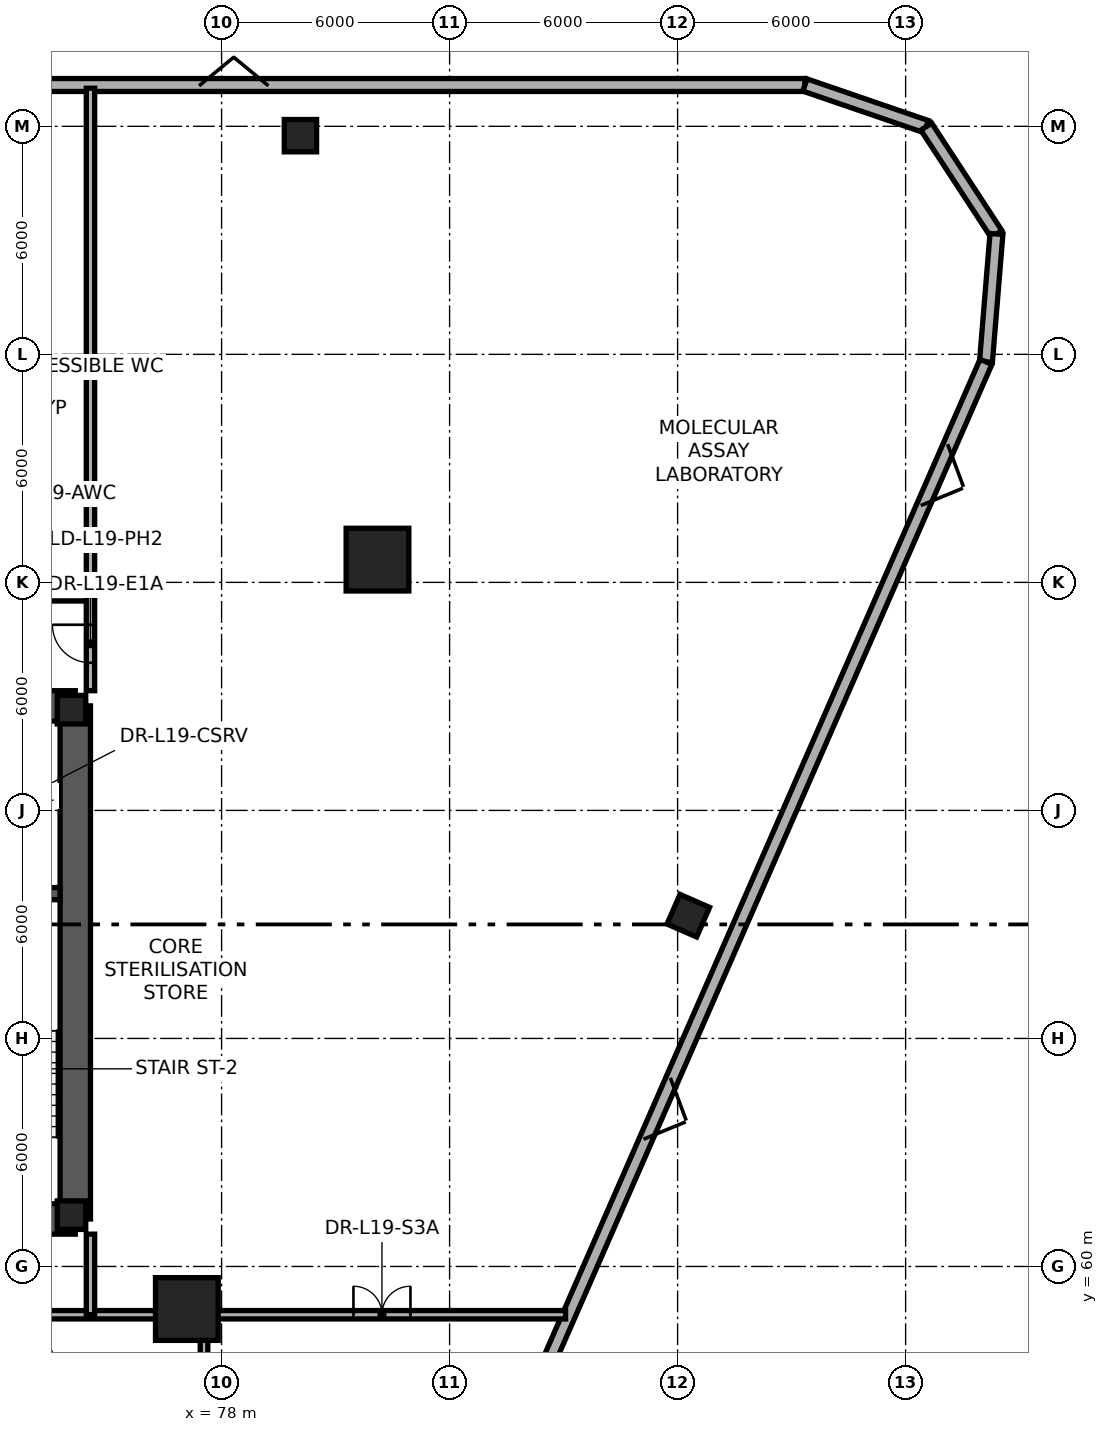
"""IFC4 building model, lengths in metres.
Left out: names, types, materials, properties, quantities, classifications, styles, units other than length and angle.
Written with IfcOpenShell. Run it as: python <this file> out.ifc"""

import sys

from ifc_helpers import new_model, si_unit, direction, frame, frame_2d, origin, origin_2d, place, context, subcontext, project, spatial, rectangle, extrude, element, fill, save


model = new_model("IFC4")
c1 = context("Model", 3, precision=1e-05, world=origin(), true_north=direction((0.0, 1.0)))
c2 = subcontext(c1, "Body", "Model", "MODEL_VIEW")
j1 = project(units=[si_unit("LENGTHUNIT", "METRE"), si_unit("PLANEANGLEUNIT", "RADIAN")], contexts=[c1])
p1 = place(None, origin())
s1 = spatial("IfcSite", under=j1, at=p1, CompositionType="ELEMENT")
p2 = place(p1, origin())
s2 = spatial("IfcBuilding", under=s1, at=p2, CompositionType="ELEMENT")
p3 = place(p2, frame((0.0, 0.0, 75.0)))
s3 = spatial("IfcBuildingStorey", under=s2, at=p3, CompositionType="ELEMENT", Elevation=75.0)
p4 = place(p3, frame((57.85, 61.25, 0.0), z_axis=(0.0, 0.0, 1.0), x_axis=(1.0, 0.0, 0.0)))
e1 = element("IfcWall", 1, at=p4, inside=s3, PredefinedType="SHEAR", context=c2, shape_type="SweptSolid", body=[
    extrude(rectangle(XDim=16.3, YDim=0.8, at=frame_2d((8.15, 0.0))), origin(), (0.0, 0.0, 1.0), 3.65),
])
p5 = place(p4, frame((1.35, 0.0, 0.0)))
e2 = element("IfcOpeningElement", 2, at=p5, cuts=e1, PredefinedType="OPENING", context=c2, shape_type="SweptSolid", body=[
    extrude(rectangle(XDim=1.15, YDim=2.15, at=frame_2d((0.575, 1.075))), frame((0.0, 0.41, 0.0), z_axis=(0.0, -1.0, 0.0), x_axis=(1.0, 0.0, 0.0)), (0.0, 0.0, 1.0), 0.82),
])
p6 = place(p4, frame((6.1, 0.0, 0.0)))
e3 = element("IfcOpeningElement", 3, at=p6, cuts=e1, PredefinedType="OPENING", context=c2, shape_type="SweptSolid", body=[
    extrude(rectangle(XDim=1.6, YDim=2.15, at=frame_2d((0.8, 1.075))), frame((0.0, 0.41, 0.0), z_axis=(0.0, -1.0, 0.0), x_axis=(1.0, 0.0, 0.0)), (0.0, 0.0, 1.0), 0.82),
])
p7 = place(p4, frame((13.55, 0.0, 0.0)))
e4 = element("IfcOpeningElement", 4, at=p7, cuts=e1, PredefinedType="OPENING", context=c2, shape_type="SweptSolid", body=[
    extrude(rectangle(XDim=1.15, YDim=2.15, at=frame_2d((0.575, 1.075))), frame((0.0, 0.41, 0.0), z_axis=(0.0, -1.0, 0.0), x_axis=(1.0, 0.0, 0.0)), (0.0, 0.0, 1.0), 0.82),
])
p8 = place(p3, frame((74.15, 61.25, 0.0), z_axis=(0.0, 0.0, 1.0), x_axis=(0.0, 1.0, 0.0)))
e5 = element("IfcWall", 5, at=p8, inside=s3, PredefinedType="SHEAR", context=c2, shape_type="SweptSolid", body=[
    extrude(rectangle(XDim=13.5, YDim=0.8, at=frame_2d((6.75, 0.0))), origin(), (0.0, 0.0, 1.0), 3.65),
])
p9 = place(p3, frame((74.15, 74.75, 0.0), z_axis=(0.0, 0.0, 1.0), x_axis=(-1.0, 0.0, 0.0)))
e6 = element("IfcWall", 6, at=p9, inside=s3, PredefinedType="SHEAR", context=c2, shape_type="SweptSolid", body=[
    extrude(rectangle(XDim=7.3, YDim=0.8, at=frame_2d((3.65, 0.0))), origin(), (0.0, 0.0, 1.0), 3.65),
])
p10 = place(p3, frame((69.91, 69.81, 0.0), z_axis=(0.0, 0.0, 1.0), x_axis=(1.0, 0.0, 0.0)))
e7 = element("IfcWall", 7, at=p10, inside=s3, PredefinedType="SHEAR", context=c2, shape_type="SweptSolid", body=[
    extrude(rectangle(XDim=3.84, YDim=0.32, at=frame_2d((1.92, 0.0))), origin(), (0.0, 0.0, 1.0), 3.65),
])
for number, where, z_axis, x_axis in (
    (8, (74.05, 61.35, 0.0), (0.0, 0.0, 1.0), (1.0, 0.0, 0.0)),
    (9, (74.05, 74.65, 0.0), (0.0, 0.0, 1.0), (1.0, 0.0, 0.0)),
):
    element("IfcColumn", number, at=place(p3, frame(where, z_axis=z_axis, x_axis=x_axis)), inside=s3, PredefinedType="COLUMN", context=c2, shape_type="SweptSolid", body=[
        extrude(rectangle(XDim=0.75, YDim=0.75, at=origin_2d()), origin(), (0.0, 0.0, 1.0), 3.65),
    ])
for number, where, z_axis, x_axis in (
    (10, (82.102, 78.599, 0.0), (0.0, 0.0, 1.0), (1.0, 0.0, 0.0)),
    (11, (77.086, 58.88, 0.0), (0.0, 0.0, 1.0), (1.0, 0.0, 0.0)),
):
    element("IfcColumn", number, at=place(p3, frame(where, z_axis=z_axis, x_axis=x_axis)), inside=s3, PredefinedType="COLUMN", context=c2, shape_type="SweptSolid", body=[
        extrude(rectangle(XDim=1.65, YDim=1.65, at=origin_2d()), origin(), (0.0, 0.0, 1.0), 3.65),
    ])
p11 = place(p3, frame((90.353, 69.24, 0.003), z_axis=(-0.039229493406, -0.00569028488, 0.999214024874), x_axis=(0.963504381608, -0.265217589574, 0.036317169537)))
e12 = element("IfcColumn", 12, at=p11, inside=s3, PredefinedType="COLUMN", context=c2, shape_type="SweptSolid", body=[
    extrude(rectangle(XDim=0.85, YDim=0.85, at=origin_2d()), origin(), (0.0, 0.0, 1.0), 3.647),
])
p12 = place(p3, frame((80.124, 89.815, 0.003), z_axis=(-0.026907963191, -0.033534551141, 0.999075270136), x_axis=(-0.779956681152, 0.625833504637, 0.0)))
e13 = element("IfcColumn", 13, at=p12, inside=s3, PredefinedType="COLUMN", context=c2, shape_type="SweptSolid", body=[
    extrude(rectangle(XDim=0.85, YDim=0.85, at=origin_2d()), origin(), (0.0, 0.0, 1.0), 3.647),
])
p13 = place(p3, frame((38.65, 91.087, 0.0), z_axis=(0.0, 0.0, 1.0), x_axis=(1.0, 0.0, 0.0)))
e14 = element("IfcWall", 14, at=p13, inside=s3, PredefinedType="STANDARD", context=c2, shape_type="SweptSolid", body=[
    extrude(rectangle(XDim=54.7, YDim=0.34, at=frame_2d((27.35, 0.0))), origin(), (0.0, 0.0, 1.0), 0.85),
])
p14 = place(p3, frame((93.35, 91.087, 0.0), z_axis=(0.0, 0.0, 1.0), x_axis=(0.945861583966, -0.324570275868, 0.0)))
e15 = element("IfcWall", 15, at=p14, inside=s3, PredefinedType="STANDARD", context=c2, shape_type="SweptSolid", body=[
    extrude(rectangle(XDim=3.375, YDim=0.34, at=frame_2d((1.688, 0.0))), origin(), (0.0, 0.0, 1.0), 3.375),
])
p15 = place(p3, frame((96.542, 89.992, 0.0), z_axis=(0.0, 0.0, 1.0), x_axis=(0.54736822803, -0.83689188247, 0.0)))
e16 = element("IfcWall", 16, at=p15, inside=s3, PredefinedType="STANDARD", context=c2, shape_type="SweptSolid", body=[
    extrude(rectangle(XDim=3.375, YDim=0.34, at=frame_2d((1.688, 0.0))), origin(), (0.0, 0.0, 1.0), 3.375),
])
p16 = place(p3, frame((98.39, 87.167, 0.0), z_axis=(0.0, 0.0, 1.0), x_axis=(-0.081806311552, -0.99664824657, 0.0)))
e17 = element("IfcWall", 17, at=p16, inside=s3, PredefinedType="STANDARD", context=c2, shape_type="SweptSolid", body=[
    extrude(rectangle(XDim=3.375, YDim=0.34, at=frame_2d((1.688, 0.0))), origin(), (0.0, 0.0, 1.0), 3.375),
])
p17 = place(p3, frame((98.114, 83.803, 0.0), z_axis=(0.0, 0.0, 1.0), x_axis=(-0.400832536075, -0.916151340131, 0.0)))
e18 = element("IfcWall", 18, at=p17, inside=s3, PredefinedType="STANDARD", context=c2, shape_type="SweptSolid", body=[
    extrude(rectangle(XDim=68.233, YDim=0.34, at=frame_2d((34.117, 0.0))), origin(), (0.0, 0.0, 1.0), 0.85),
])
p18 = place(p3, frame((36.684, 77.62, 0.0), z_axis=(0.0, 0.0, 1.0), x_axis=(1.0, 0.0, 0.0)))
e19 = element("IfcWall", 19, at=p18, inside=s3, PredefinedType="PARTITIONING", context=c2, shape_type="SweptSolid", body=[
    extrude(rectangle(XDim=37.866, YDim=0.22, at=frame_2d((18.933, 0.0))), origin(), (0.0, 0.0, 1.0), 2.505),
])
p19 = place(p18, frame((32.076, 0.0, 0.0)))
e20 = element("IfcOpeningElement", 20, at=p19, cuts=e19, PredefinedType="OPENING", context=c2, shape_type="SweptSolid", body=[
    extrude(rectangle(XDim=0.98, YDim=2.1, at=frame_2d((0.49, 1.05))), frame((0.0, 0.12, 0.0), z_axis=(0.0, -1.0, 0.0), x_axis=(1.0, 0.0, 0.0)), (0.0, 0.0, 1.0), 0.24),
])
p20 = place(p18, frame((34.901, 0.0, 0.0)))
e21 = element("IfcOpeningElement", 21, at=p20, cuts=e19, PredefinedType="OPENING", context=c2, shape_type="SweptSolid", body=[
    extrude(rectangle(XDim=0.98, YDim=2.1, at=frame_2d((0.49, 1.05))), frame((0.0, 0.12, 0.0), z_axis=(0.0, -1.0, 0.0), x_axis=(1.0, 0.0, 0.0)), (0.0, 0.0, 1.0), 0.24),
])
p21 = place(p18, frame((4.909, 0.0, 0.0)))
e22 = element("IfcOpeningElement", 22, at=p21, cuts=e19, PredefinedType="OPENING", context=c2, shape_type="SweptSolid", body=[
    extrude(rectangle(XDim=1.0, YDim=2.1, at=frame_2d((0.5, 1.05))), frame((0.0, 0.12, 0.0), z_axis=(0.0, -1.0, 0.0), x_axis=(1.0, 0.0, 0.0)), (0.0, 0.0, 1.0), 0.24),
])
p22 = place(p18, frame((16.968, 0.0, 0.0)))
e23 = element("IfcOpeningElement", 23, at=p22, cuts=e19, PredefinedType="OPENING", context=c2, shape_type="SweptSolid", body=[
    extrude(rectangle(XDim=1.0, YDim=2.1, at=frame_2d((0.5, 1.05))), frame((0.0, 0.12, 0.0), z_axis=(0.0, -1.0, 0.0), x_axis=(1.0, 0.0, 0.0)), (0.0, 0.0, 1.0), 0.24),
])
p23 = place(p18, frame((27.177, 0.0, 0.0)))
e24 = element("IfcOpeningElement", 24, at=p23, cuts=e19, PredefinedType="OPENING", context=c2, shape_type="SweptSolid", body=[
    extrude(rectangle(XDim=1.0, YDim=2.1, at=frame_2d((0.5, 1.05))), frame((0.0, 0.12, 0.0), z_axis=(0.0, -1.0, 0.0), x_axis=(1.0, 0.0, 0.0)), (0.0, 0.0, 1.0), 0.24),
])
p24 = place(p3, frame((77.538, 36.986, 0.0), z_axis=(0.0, 0.0, 1.0), x_axis=(0.0, 1.0, 0.0)))
e25 = element("IfcWall", 25, at=p24, inside=s3, PredefinedType="PARTITIONING", context=c2, shape_type="SweptSolid", body=[
    extrude(rectangle(XDim=21.744, YDim=0.2, at=frame_2d((10.872, 0.0))), origin(), (0.0, 0.0, 1.0), 2.505),
])
p25 = place(p3, frame((55.33, 58.73, 0.0), z_axis=(0.0, 0.0, 1.0), x_axis=(1.0, 0.0, 0.0)))
e26 = element("IfcWall", 26, at=p25, inside=s3, PredefinedType="PARTITIONING", context=c2, shape_type="SweptSolid", body=[
    extrude(rectangle(XDim=31.721, YDim=0.22, at=frame_2d((15.861, 0.0))), origin(), (0.0, 0.0, 1.0), 2.505),
])
p26 = place(p25, frame((5.06, 0.0, 0.0)))
e27 = element("IfcOpeningElement", 27, at=p26, cuts=e26, PredefinedType="OPENING", context=c2, shape_type="SweptSolid", body=[
    extrude(rectangle(XDim=1.5, YDim=2.2, at=frame_2d((0.75, 1.1))), frame((0.0, 0.12, 0.0), z_axis=(0.0, -1.0, 0.0), x_axis=(1.0, 0.0, 0.0)), (0.0, 0.0, 1.0), 0.24),
])
p27 = place(p25, frame((16.089, 0.0, 0.0)))
e28 = element("IfcOpeningElement", 28, at=p27, cuts=e26, PredefinedType="OPENING", context=c2, shape_type="SweptSolid", body=[
    extrude(rectangle(XDim=1.5, YDim=2.2, at=frame_2d((0.75, 1.1))), frame((0.0, 0.12, 0.0), z_axis=(0.0, -1.0, 0.0), x_axis=(1.0, 0.0, 0.0)), (0.0, 0.0, 1.0), 0.24),
])
p28 = place(p25, frame((26.14, 0.0, 0.0)))
e29 = element("IfcOpeningElement", 29, at=p28, cuts=e26, PredefinedType="OPENING", context=c2, shape_type="SweptSolid", body=[
    extrude(rectangle(XDim=1.5, YDim=2.2, at=frame_2d((0.75, 1.1))), frame((0.0, 0.12, 0.0), z_axis=(0.0, -1.0, 0.0), x_axis=(1.0, 0.0, 0.0)), (0.0, 0.0, 1.0), 0.24),
])
p29 = place(p3, frame((74.55, 75.15, 0.0), z_axis=(0.0, 0.0, 1.0), x_axis=(0.0, 1.0, 0.0)))
e30 = element("IfcWall", 30, at=p29, inside=s3, PredefinedType="PARTITIONING", context=c2, shape_type="SweptSolid", body=[
    extrude(rectangle(XDim=15.852, YDim=0.22, at=frame_2d((7.926, 0.0))), origin(), (0.0, 0.0, 1.0), 2.505),
])
p30 = place(p29, frame((0.735, 0.0, 0.0)))
e31 = element("IfcOpeningElement", 31, at=p30, cuts=e30, PredefinedType="OPENING", context=c2, shape_type="SweptSolid", body=[
    extrude(rectangle(XDim=1.0, YDim=2.1, at=frame_2d((0.5, 1.05))), frame((0.0, 0.12, 0.0), z_axis=(0.0, -1.0, 0.0), x_axis=(1.0, 0.0, 0.0)), (0.0, 0.0, 1.0), 0.24),
])
p31 = place(p3, frame((74.55, 58.73, 0.0), z_axis=(0.0, 0.0, 1.0), x_axis=(0.0, 1.0, 0.0)))
e32 = element("IfcWall", 32, at=p31, inside=s3, PredefinedType="PARTITIONING", context=c2, shape_type="SweptSolid", body=[
    extrude(rectangle(XDim=2.12, YDim=0.22, at=frame_2d((1.06, 0.0))), origin(), (0.0, 0.0, 1.0), 2.655),
])
p32 = place(p28, origin())
e33 = element("IfcDoor", 33, at=p32, inside=s3, OperationType="DOUBLE_DOOR_SINGLE_SWING", PredefinedType="DOOR", context=c2, shape_type="SweptSolid", body=[
    extrude(rectangle(XDim=1.5, YDim=2.2, at=frame_2d((0.75, 1.1))), frame((0.0, 0.025, 0.0), z_axis=(0.0, -1.0, 0.0), x_axis=(1.0, 0.0, 0.0)), (0.0, 0.0, 1.0), 0.05),
])
fill(e29, e33)
p33 = place(p30, origin())
e34 = element("IfcDoor", 34, at=p33, inside=s3, OperationType="SINGLE_SWING_RIGHT", PredefinedType="DOOR", context=c2, shape_type="SweptSolid", body=[
    extrude(rectangle(XDim=1.0, YDim=2.1, at=frame_2d((0.5, 1.05))), frame((0.0, 0.025, 0.0), z_axis=(0.0, -1.0, 0.0), x_axis=(1.0, 0.0, 0.0)), (0.0, 0.0, 1.0), 0.05),
])
fill(e31, e34)
save(model, sys.argv[1])
